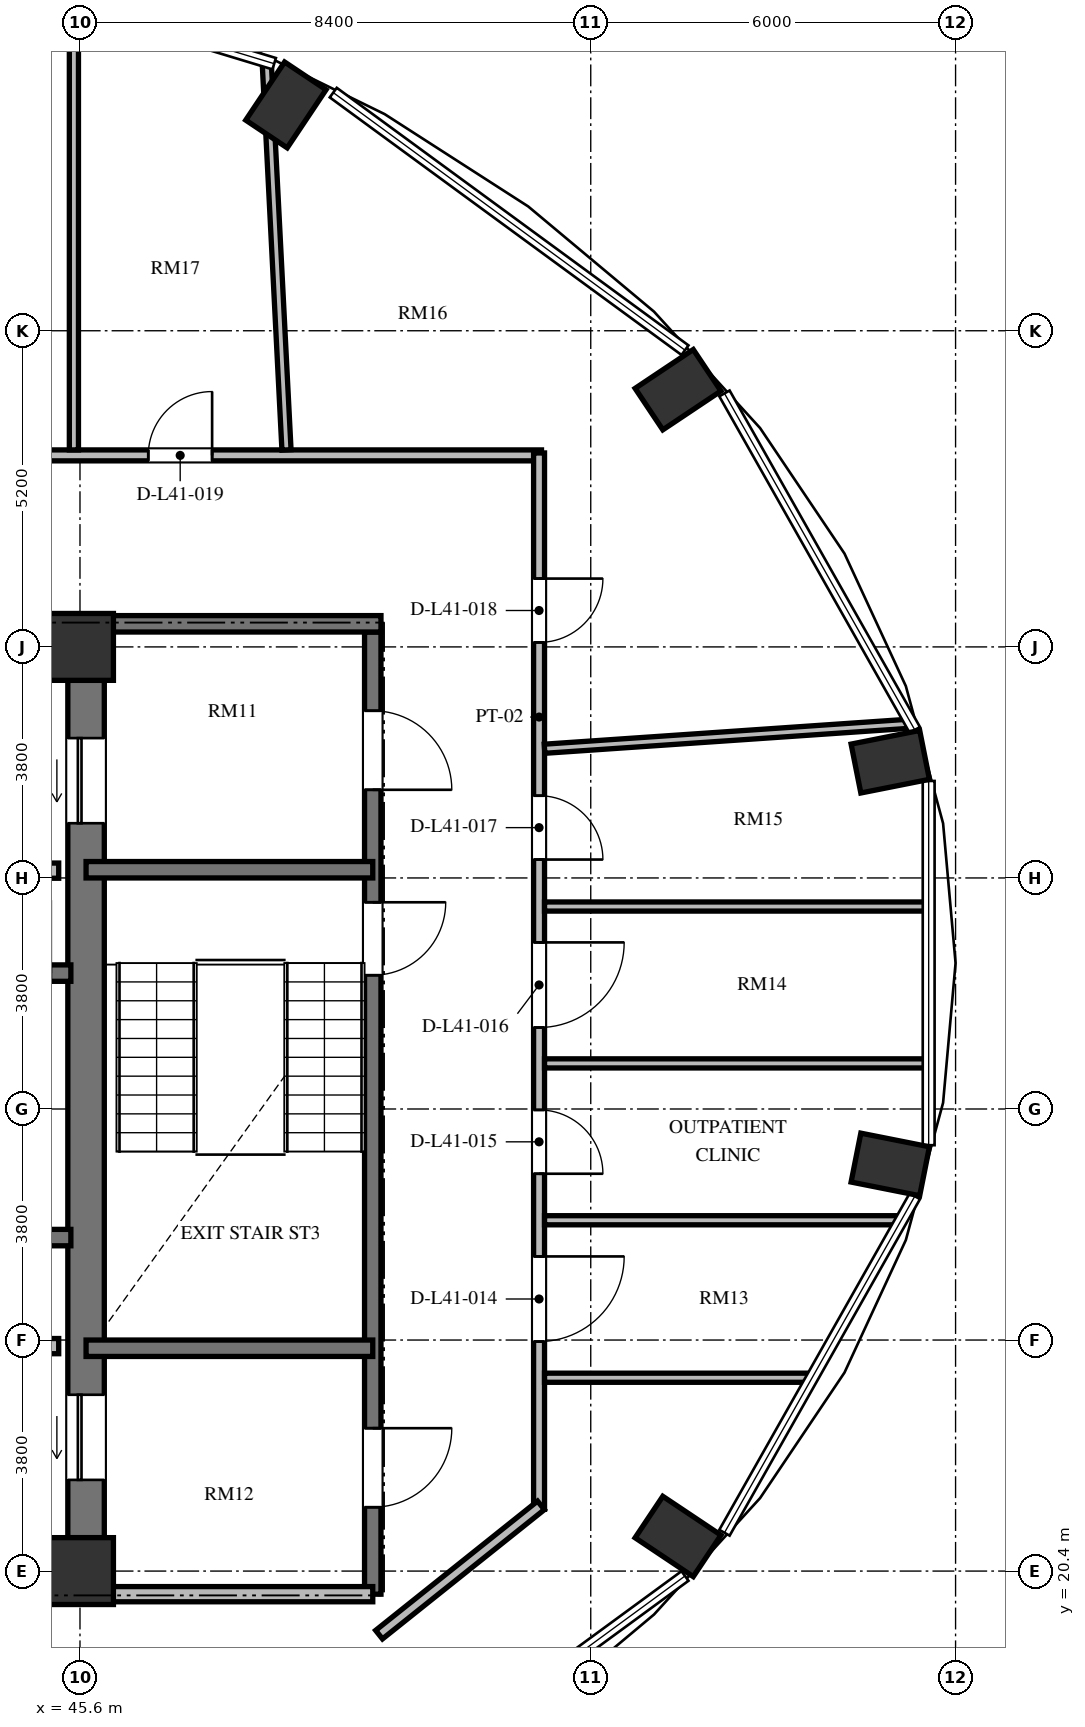
"""IFC4 building model, lengths in metres.
Left out: names, types, materials, properties, quantities, classifications, styles, units other than length and angle.
Written with IfcOpenShell. Run it as: python <this file> out.ifc"""

import sys

from ifc_helpers import new_model, si_unit, direction, frame, frame_2d, origin, origin_2d, place, context, subcontext, project, spatial, rectangle, extrude, element, fill, save


model = new_model("IFC4")
c1 = context("Model", 3, precision=1e-05, world=origin(), true_north=direction((0.0, 1.0)))
c2 = subcontext(c1, "Body", "Model", "MODEL_VIEW")
j1 = project(units=[si_unit("LENGTHUNIT", "METRE"), si_unit("PLANEANGLEUNIT", "RADIAN")], contexts=[c1])
p1 = place(None, origin())
s1 = spatial("IfcSite", under=j1, at=p1, CompositionType="ELEMENT")
p2 = place(p1, origin())
s2 = spatial("IfcBuilding", under=s1, at=p2, CompositionType="ELEMENT")
p3 = place(p2, frame((0.0, 0.0, 160.176)))
s3 = spatial("IfcBuildingStorey", under=s2, at=p3, CompositionType="ELEMENT", Elevation=160.176)
for number, where, z_axis, x_axis in (
    (1, (55.436, 20.969, 0.0), (0.0, 0.0, 1.0), (0.831, -0.556, 0.0)),
    (2, (58.926, 27.088, 0.0), (0.0, 0.0, 1.0), (0.981, -0.195, 0.0)),
    (3, (58.926, 33.712, 0.0), (0.0, 0.0, 1.0), (0.981, 0.195, 0.0)),
    (4, (55.436, 39.831, 0.0), (0.0, 0.0, 1.0), (0.831, 0.556, 0.0)),
    (5, (48.987, 44.514, 0.0), (0.0, 0.0, 1.0), (0.556, 0.831, 0.0)),
):
    element("IfcColumn", number, at=place(p3, frame(where, z_axis=z_axis, x_axis=x_axis)), inside=s3, PredefinedType="COLUMN", context=c2, shape_type="SweptSolid", body=[
        extrude(rectangle(XDim=1.15, YDim=0.82, at=origin_2d()), origin(), (0.0, 0.0, 1.0), 3.648),
    ])
for number, where, z_axis, x_axis in (
    (6, (45.6, 20.4, 0.0), (0.0, 0.0, 1.0), (1.0, 0.0, 0.0)),
    (7, (45.6, 35.6, 0.0), (0.0, 0.0, 1.0), (1.0, 0.0, 0.0)),
):
    element("IfcColumn", number, at=place(p3, frame(where, z_axis=z_axis, x_axis=x_axis)), inside=s3, PredefinedType="COLUMN", context=c2, shape_type="SweptSolid", body=[
        extrude(rectangle(XDim=1.1, YDim=1.1, at=origin_2d()), origin(), (0.0, 0.0, 1.0), 3.648),
    ])
p4 = place(p3, frame((45.7, 20.95, 0.0), z_axis=(0.0, 0.0, 1.0), x_axis=(0.0, 1.0, 0.0)))
e8 = element("IfcWall", 8, at=p4, inside=s3, PredefinedType="SHEAR", context=c2, shape_type="SweptSolid", body=[
    extrude(rectangle(XDim=14.1, YDim=0.6, at=frame_2d((7.05, 0.0))), origin(), (0.0, 0.0, 1.0), 3.648),
])
p5 = place(p4, frame((11.75, 0.0, 0.0)))
e9 = element("IfcOpeningElement", 9, at=p5, cuts=e8, PredefinedType="OPENING", context=c2, shape_type="SweptSolid", body=[
    extrude(rectangle(XDim=1.4, YDim=2.3, at=frame_2d((0.7, 1.15))), frame((0.0, 0.31, 0.0), z_axis=(0.0, -1.0, 0.0), x_axis=(1.0, 0.0, 0.0)), (0.0, 0.0, 1.0), 0.62),
])
p6 = place(p4, frame((0.95, 0.0, 0.0)))
e10 = element("IfcOpeningElement", 10, at=p6, cuts=e8, PredefinedType="OPENING", context=c2, shape_type="SweptSolid", body=[
    extrude(rectangle(XDim=1.4, YDim=2.3, at=frame_2d((0.7, 1.15))), frame((0.0, 0.31, 0.0), z_axis=(0.0, -1.0, 0.0), x_axis=(1.0, 0.0, 0.0)), (0.0, 0.0, 1.0), 0.62),
])
p7 = place(p3, frame((37.465, 30.235, 0.0), z_axis=(0.0, 0.0, 1.0), x_axis=(1.0, 0.0, 0.0)))
e11 = element("IfcWall", 11, at=p7, inside=s3, PredefinedType="SHEAR", context=c2, shape_type="SweptSolid", body=[
    extrude(rectangle(XDim=7.985, YDim=0.27, at=frame_2d((3.992, 0.0))), origin(), (0.0, 0.0, 1.0), 3.648),
])
p8 = place(p7, frame((6.455, 0.0, 0.0)))
e12 = element("IfcOpeningElement", 12, at=p8, cuts=e11, PredefinedType="OPENING", context=c2, shape_type="SweptSolid", body=[
    extrude(rectangle(XDim=1.2, YDim=2.15, at=frame_2d((0.6, 1.075))), frame((0.0, 0.145, 0.0), z_axis=(0.0, -1.0, 0.0), x_axis=(1.0, 0.0, 0.0)), (0.0, 0.0, 1.0), 0.29),
])
p9 = place(p3, frame((37.465, 25.885, 0.0), z_axis=(0.0, 0.0, 1.0), x_axis=(1.0, 0.0, 0.0)))
e13 = element("IfcWall", 13, at=p9, inside=s3, PredefinedType="SHEAR", context=c2, shape_type="SweptSolid", body=[
    extrude(rectangle(XDim=7.985, YDim=0.27, at=frame_2d((3.992, 0.0))), origin(), (0.0, 0.0, 1.0), 3.648),
])
for number, where, z_axis, x_axis in (
    (14, (42.95, 31.92, 0.0), (0.0, 0.0, 1.0), (1.0, 0.0, 0.0)),
    (15, (42.95, 24.1, 0.0), (0.0, 0.0, 1.0), (1.0, 0.0, 0.0)),
):
    element("IfcWall", number, at=place(p3, frame(where, z_axis=z_axis, x_axis=x_axis)), inside=s3, PredefinedType="SOLIDWALL", context=c2, shape_type="SweptSolid", body=[
        extrude(rectangle(XDim=2.3, YDim=0.25, at=frame_2d((1.15, 0.0))), origin(), (0.0, 0.0, 1.0), 3.428),
    ])
p10 = place(p3, frame((50.415, 35.845, 0.0), z_axis=(0.0, 0.0, 1.0), x_axis=(0.0, -1.0, 0.0)))
e16 = element("IfcWall", 16, at=p10, inside=s3, PredefinedType="SHEAR", context=c2, shape_type="SweptSolid", body=[
    extrude(rectangle(XDim=15.825, YDim=0.27, at=frame_2d((7.913, 0.0))), origin(), (0.0, 0.0, 1.0), 3.648),
])
p11 = place(p10, frame((4.445, 0.0, 0.0)))
e17 = element("IfcOpeningElement", 17, at=p11, cuts=e16, PredefinedType="OPENING", context=c2, shape_type="SweptSolid", body=[
    extrude(rectangle(XDim=1.2, YDim=2.15, at=frame_2d((0.6, 1.075))), frame((0.0, 0.145, 0.0), z_axis=(0.0, -1.0, 0.0), x_axis=(1.0, 0.0, 0.0)), (0.0, 0.0, 1.0), 0.29),
])
p12 = place(p10, frame((1.295, 0.0, 0.0)))
e18 = element("IfcOpeningElement", 18, at=p12, cuts=e16, PredefinedType="OPENING", context=c2, shape_type="SweptSolid", body=[
    extrude(rectangle(XDim=1.3, YDim=2.2, at=frame_2d((0.65, 1.1))), frame((0.0, 0.145, 0.0), z_axis=(0.0, -1.0, 0.0), x_axis=(1.0, 0.0, 0.0)), (0.0, 0.0, 1.0), 0.29),
])
p13 = place(p10, frame((13.095, 0.0, 0.0)))
e19 = element("IfcOpeningElement", 19, at=p13, cuts=e16, PredefinedType="OPENING", context=c2, shape_type="SweptSolid", body=[
    extrude(rectangle(XDim=1.3, YDim=2.2, at=frame_2d((0.65, 1.1))), frame((0.0, 0.145, 0.0), z_axis=(0.0, -1.0, 0.0), x_axis=(1.0, 0.0, 0.0)), (0.0, 0.0, 1.0), 0.29),
])
p14 = place(p3, frame((46.0, 35.98, 0.0), z_axis=(0.0, 0.0, 1.0), x_axis=(1.0, 0.0, 0.0)))
e20 = element("IfcWall", 20, at=p14, inside=s3, PredefinedType="SHEAR", context=c2, shape_type="SweptSolid", body=[
    extrude(rectangle(XDim=4.55, YDim=0.27, at=frame_2d((2.275, 0.0))), origin(), (0.0, 0.0, 1.0), 3.648),
])
for number, where, z_axis, x_axis in (
    (21, (45.7, 31.935, 0.0), (0.0, 0.0, 1.0), (1.0, 0.0, 0.0)),
    (22, (45.7, 24.065, 0.0), (0.0, 0.0, 1.0), (1.0, 0.0, 0.0)),
):
    element("IfcWall", number, at=place(p3, frame(where, z_axis=z_axis, x_axis=x_axis)), inside=s3, PredefinedType="SHEAR", context=c2, shape_type="SweptSolid", body=[
        extrude(rectangle(XDim=4.715, YDim=0.27, at=frame_2d((2.357, 0.0))), origin(), (0.0, 0.0, 1.0), 3.648),
    ])
p15 = place(p3, frame((45.7, 20.02, 0.0), z_axis=(0.0, 0.0, 1.0), x_axis=(1.0, 0.0, 0.0)))
e23 = element("IfcWall", 23, at=p15, inside=s3, PredefinedType="SOLIDWALL", context=c2, shape_type="SweptSolid", body=[
    extrude(rectangle(XDim=4.715, YDim=0.25, at=frame_2d((2.357, 0.0))), origin(), (0.0, 0.0, 1.0), 3.428),
])
p16 = place(p3, frame((39.46, 38.75, 0.0), z_axis=(0.0, 0.0, 1.0), x_axis=(1.0, 0.0, 0.0)))
e24 = element("IfcWall", 24, at=p16, inside=s3, PredefinedType="PARTITIONING", context=c2, shape_type="SweptSolid", body=[
    extrude(rectangle(XDim=13.73, YDim=0.18, at=frame_2d((6.865, 0.0))), origin(), (0.0, 0.0, 1.0), 3.428),
])
p17 = place(p16, frame((7.263, 0.0, 0.0)))
e25 = element("IfcOpeningElement", 25, at=p17, cuts=e24, PredefinedType="OPENING", context=c2, shape_type="SweptSolid", body=[
    extrude(rectangle(XDim=1.05, YDim=2.15, at=frame_2d((0.525, 1.075))), frame((0.0, 0.1, 0.0), z_axis=(0.0, -1.0, 0.0), x_axis=(1.0, 0.0, 0.0)), (0.0, 0.0, 1.0), 0.2),
])
p18 = place(p16, frame((3.765, 0.0, 0.0)))
e26 = element("IfcOpeningElement", 26, at=p18, cuts=e24, PredefinedType="OPENING", context=c2, shape_type="SweptSolid", body=[
    extrude(rectangle(XDim=1.05, YDim=2.15, at=frame_2d((0.525, 1.075))), frame((0.0, 0.1, 0.0), z_axis=(0.0, -1.0, 0.0), x_axis=(1.0, 0.0, 0.0)), (0.0, 0.0, 1.0), 0.2),
])
p19 = place(p3, frame((53.15, 38.79, 0.0), z_axis=(0.0, 0.0, 1.0), x_axis=(0.0, -1.0, 0.0)))
e27 = element("IfcWall", 27, at=p19, inside=s3, PredefinedType="PARTITIONING", context=c2, shape_type="SweptSolid", body=[
    extrude(rectangle(XDim=17.374, YDim=0.18, at=frame_2d((8.687, 0.0))), origin(), (0.0, 0.0, 1.0), 3.428),
])
p20 = place(p19, frame((13.215, 0.0, 0.0)))
e28 = element("IfcOpeningElement", 28, at=p20, cuts=e27, PredefinedType="OPENING", context=c2, shape_type="SweptSolid", body=[
    extrude(rectangle(XDim=1.4, YDim=2.2, at=frame_2d((0.7, 1.1))), frame((0.0, 0.1, 0.0), z_axis=(0.0, -1.0, 0.0), x_axis=(1.0, 0.0, 0.0)), (0.0, 0.0, 1.0), 0.2),
])
p21 = place(p19, frame((10.805, 0.0, 0.0)))
e29 = element("IfcOpeningElement", 29, at=p21, cuts=e27, PredefinedType="OPENING", context=c2, shape_type="SweptSolid", body=[
    extrude(rectangle(XDim=1.05, YDim=2.15, at=frame_2d((0.525, 1.075))), frame((0.0, 0.1, 0.0), z_axis=(0.0, -1.0, 0.0), x_axis=(1.0, 0.0, 0.0)), (0.0, 0.0, 1.0), 0.2),
])
p22 = place(p19, frame((8.05, 0.0, 0.0)))
e30 = element("IfcOpeningElement", 30, at=p22, cuts=e27, PredefinedType="OPENING", context=c2, shape_type="SweptSolid", body=[
    extrude(rectangle(XDim=1.4, YDim=2.2, at=frame_2d((0.7, 1.1))), frame((0.0, 0.1, 0.0), z_axis=(0.0, -1.0, 0.0), x_axis=(1.0, 0.0, 0.0)), (0.0, 0.0, 1.0), 0.2),
])
p23 = place(p19, frame((5.637, 0.0, 0.0)))
e31 = element("IfcOpeningElement", 31, at=p23, cuts=e27, PredefinedType="OPENING", context=c2, shape_type="SweptSolid", body=[
    extrude(rectangle(XDim=1.05, YDim=2.15, at=frame_2d((0.525, 1.075))), frame((0.0, 0.1, 0.0), z_axis=(0.0, -1.0, 0.0), x_axis=(1.0, 0.0, 0.0)), (0.0, 0.0, 1.0), 0.2),
])
p24 = place(p19, frame((2.066, 0.0, 0.0)))
e32 = element("IfcOpeningElement", 32, at=p24, cuts=e27, PredefinedType="OPENING", context=c2, shape_type="SweptSolid", body=[
    extrude(rectangle(XDim=1.05, YDim=2.15, at=frame_2d((0.525, 1.075))), frame((0.0, 0.1, 0.0), z_axis=(0.0, -1.0, 0.0), x_axis=(1.0, 0.0, 0.0)), (0.0, 0.0, 1.0), 0.2),
])
p25 = place(p3, frame((53.181, 21.481, 0.0), z_axis=(0.0, 0.0, 1.0), x_axis=(-0.781420737726, -0.624004511724, 0.0)))
e33 = element("IfcWall", 33, at=p25, inside=s3, PredefinedType="PARTITIONING", context=c2, shape_type="SweptSolid", body=[
    extrude(rectangle(XDim=3.407, YDim=0.18, at=frame_2d((1.704, 0.0))), origin(), (0.0, 0.0, 1.0), 3.428),
])
p26 = place(p3, frame((53.24, 23.58, 0.0), z_axis=(0.0, 0.0, 1.0), x_axis=(1.0, 0.0, 0.0)))
e34 = element("IfcWall", 34, at=p26, inside=s3, PredefinedType="PARTITIONING", context=c2, shape_type="SweptSolid", body=[
    extrude(rectangle(XDim=4.393, YDim=0.15, at=frame_2d((2.196, 0.0))), origin(), (0.0, 0.0, 1.0), 3.428),
])
p27 = place(p3, frame((53.24, 26.17, 0.0), z_axis=(0.0, 0.0, 1.0), x_axis=(1.0, 0.0, 0.0)))
e35 = element("IfcWall", 35, at=p27, inside=s3, PredefinedType="PARTITIONING", context=c2, shape_type="SweptSolid", body=[
    extrude(rectangle(XDim=5.857, YDim=0.15, at=frame_2d((2.929, 0.0))), origin(), (0.0, 0.0, 1.0), 3.428),
])
for number, where, z_axis, x_axis in (
    (36, (53.24, 28.75, 0.0), (0.0, 0.0, 1.0), (1.0, 0.0, 0.0)),
    (37, (53.24, 31.33, 0.0), (0.0, 0.0, 1.0), (1.0, 0.0, 0.0)),
):
    element("IfcWall", number, at=place(p3, frame(where, z_axis=z_axis, x_axis=x_axis)), inside=s3, PredefinedType="PARTITIONING", context=c2, shape_type="SweptSolid", body=[
        extrude(rectangle(XDim=6.307, YDim=0.15, at=frame_2d((3.154, 0.0))), origin(), (0.0, 0.0, 1.0), 3.428),
    ])
p28 = place(p3, frame((53.24, 33.925, 0.0), z_axis=(0.0, 0.0, 1.0), x_axis=(0.997659173086, 0.068382558873, 0.0)))
e38 = element("IfcWall", 38, at=p28, inside=s3, PredefinedType="PARTITIONING", context=c2, shape_type="SweptSolid", body=[
    extrude(rectangle(XDim=6.052, YDim=0.15, at=frame_2d((3.026, 0.0))), origin(), (0.0, 0.0, 1.0), 2.863),
])
p29 = place(p3, frame((45.5, 38.84, 0.0), z_axis=(0.0, 0.0, 1.0), x_axis=(0.0, 1.0, 0.0)))
e39 = element("IfcWall", 39, at=p29, inside=s3, PredefinedType="PARTITIONING", context=c2, shape_type="SweptSolid", body=[
    extrude(rectangle(XDim=7.336, YDim=0.15, at=frame_2d((3.668, 0.0))), origin(), (0.0, 0.0, 1.0), 3.428),
])
p30 = place(p3, frame((48.996, 38.84, 0.0), z_axis=(0.0, 0.0, 1.0), x_axis=(-0.050906361105, 0.998703430653, 0.0)))
e40 = element("IfcWall", 40, at=p30, inside=s3, PredefinedType="PARTITIONING", context=c2, shape_type="SweptSolid", body=[
    extrude(rectangle(XDim=6.398, YDim=0.15, at=frame_2d((3.199, 0.0))), origin(), (0.0, 0.0, 1.0), 3.428),
])
p31 = place(p5, origin())
e41 = element("IfcDoor", 41, at=p31, inside=s3, OperationType="SLIDING_TO_LEFT", PredefinedType="DOOR", context=c2, shape_type="SweptSolid", body=[
    extrude(rectangle(XDim=1.4, YDim=2.3, at=frame_2d((0.7, 1.15))), frame((0.0, 0.025, 0.0), z_axis=(0.0, -1.0, 0.0), x_axis=(1.0, 0.0, 0.0)), (0.0, 0.0, 1.0), 0.05),
])
fill(e9, e41)
p32 = place(p6, origin())
e42 = element("IfcDoor", 42, at=p32, inside=s3, OperationType="SLIDING_TO_LEFT", PredefinedType="DOOR", context=c2, shape_type="SweptSolid", body=[
    extrude(rectangle(XDim=1.4, YDim=2.3, at=frame_2d((0.7, 1.15))), frame((0.0, 0.025, 0.0), z_axis=(0.0, -1.0, 0.0), x_axis=(1.0, 0.0, 0.0)), (0.0, 0.0, 1.0), 0.05),
])
fill(e10, e42)
p33 = place(p11, origin())
e43 = element("IfcDoor", 43, at=p33, inside=s3, OperationType="SINGLE_SWING_LEFT", PredefinedType="DOOR", context=c2, shape_type="SweptSolid", body=[
    extrude(rectangle(XDim=1.2, YDim=2.15, at=frame_2d((0.6, 1.075))), frame((0.0, 0.025, 0.0), z_axis=(0.0, -1.0, 0.0), x_axis=(1.0, 0.0, 0.0)), (0.0, 0.0, 1.0), 0.05),
])
fill(e17, e43)
p34 = place(p12, origin())
e44 = element("IfcDoor", 44, at=p34, inside=s3, OperationType="SINGLE_SWING_RIGHT", PredefinedType="DOOR", context=c2, shape_type="SweptSolid", body=[
    extrude(rectangle(XDim=1.3, YDim=2.2, at=frame_2d((0.65, 1.1))), frame((0.0, 0.025, 0.0), z_axis=(0.0, -1.0, 0.0), x_axis=(1.0, 0.0, 0.0)), (0.0, 0.0, 1.0), 0.05),
])
fill(e18, e44)
p35 = place(p13, origin())
e45 = element("IfcDoor", 45, at=p35, inside=s3, OperationType="SINGLE_SWING_LEFT", PredefinedType="DOOR", context=c2, shape_type="SweptSolid", body=[
    extrude(rectangle(XDim=1.3, YDim=2.2, at=frame_2d((0.65, 1.1))), frame((0.0, 0.025, 0.0), z_axis=(0.0, -1.0, 0.0), x_axis=(1.0, 0.0, 0.0)), (0.0, 0.0, 1.0), 0.05),
])
fill(e19, e45)
p36 = place(p20, origin())
e46 = element("IfcDoor", 46, at=p36, inside=s3, OperationType="SINGLE_SWING_LEFT", PredefinedType="DOOR", context=c2, shape_type="SweptSolid", body=[
    extrude(rectangle(XDim=1.4, YDim=2.2, at=frame_2d((0.7, 1.1))), frame((0.0, 0.025, 0.0), z_axis=(0.0, -1.0, 0.0), x_axis=(1.0, 0.0, 0.0)), (0.0, 0.0, 1.0), 0.05),
])
fill(e28, e46)
p37 = place(p21, origin())
e47 = element("IfcDoor", 47, at=p37, inside=s3, OperationType="SINGLE_SWING_RIGHT", PredefinedType="DOOR", context=c2, shape_type="SweptSolid", body=[
    extrude(rectangle(XDim=1.05, YDim=2.15, at=frame_2d((0.525, 1.075))), frame((0.0, 0.025, 0.0), z_axis=(0.0, -1.0, 0.0), x_axis=(1.0, 0.0, 0.0)), (0.0, 0.0, 1.0), 0.05),
])
fill(e29, e47)
p38 = place(p22, origin())
e48 = element("IfcDoor", 48, at=p38, inside=s3, OperationType="SINGLE_SWING_LEFT", PredefinedType="DOOR", context=c2, shape_type="SweptSolid", body=[
    extrude(rectangle(XDim=1.4, YDim=2.2, at=frame_2d((0.7, 1.1))), frame((0.0, 0.025, 0.0), z_axis=(0.0, -1.0, 0.0), x_axis=(1.0, 0.0, 0.0)), (0.0, 0.0, 1.0), 0.05),
])
fill(e30, e48)
p39 = place(p23, origin())
e49 = element("IfcDoor", 49, at=p39, inside=s3, OperationType="SINGLE_SWING_RIGHT", PredefinedType="DOOR", context=c2, shape_type="SweptSolid", body=[
    extrude(rectangle(XDim=1.05, YDim=2.15, at=frame_2d((0.525, 1.075))), frame((0.0, 0.025, 0.0), z_axis=(0.0, -1.0, 0.0), x_axis=(1.0, 0.0, 0.0)), (0.0, 0.0, 1.0), 0.05),
])
fill(e31, e49)
p40 = place(p24, origin())
e50 = element("IfcDoor", 50, at=p40, inside=s3, OperationType="SINGLE_SWING_LEFT", PredefinedType="DOOR", context=c2, shape_type="SweptSolid", body=[
    extrude(rectangle(XDim=1.05, YDim=2.15, at=frame_2d((0.525, 1.075))), frame((0.0, 0.025, 0.0), z_axis=(0.0, -1.0, 0.0), x_axis=(1.0, 0.0, 0.0)), (0.0, 0.0, 1.0), 0.05),
])
fill(e32, e50)
p41 = place(p17, origin())
e51 = element("IfcDoor", 51, at=p41, inside=s3, OperationType="SINGLE_SWING_RIGHT", PredefinedType="DOOR", context=c2, shape_type="SweptSolid", body=[
    extrude(rectangle(XDim=1.05, YDim=2.15, at=frame_2d((0.525, 1.075))), frame((0.0, 0.025, 0.0), z_axis=(0.0, -1.0, 0.0), x_axis=(1.0, 0.0, 0.0)), (0.0, 0.0, 1.0), 0.05),
])
fill(e25, e51)
save(model, sys.argv[1])
